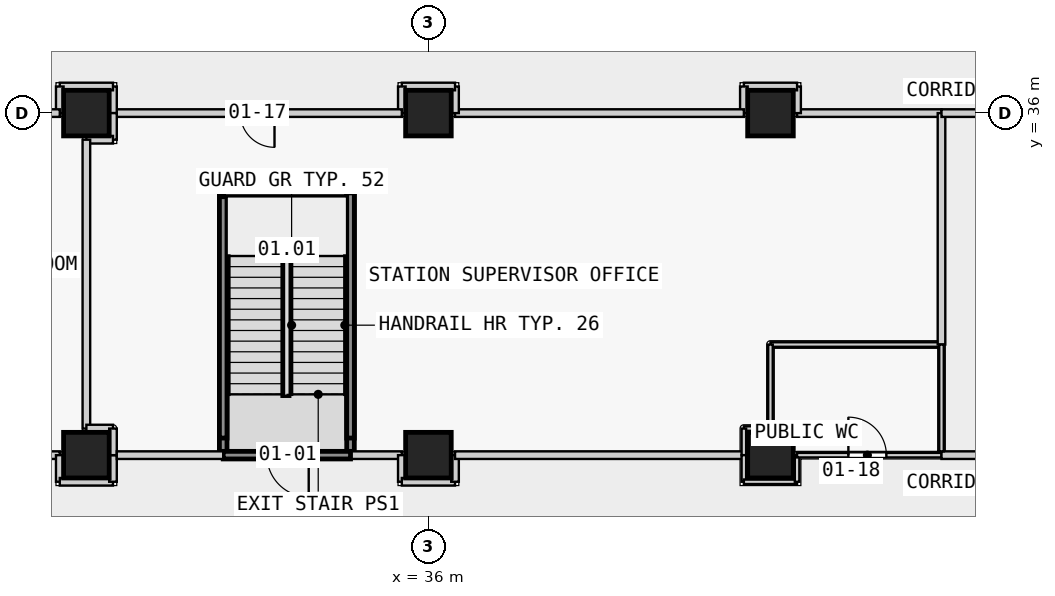
"""IFC4 building model, lengths in metres.
Left out: names, types, materials, properties, quantities, classifications, styles, units other than length and angle.
Written with IfcOpenShell. Run it as: python <this file> out.ifc"""

import sys

from ifc_helpers import new_model, si_unit, direction, frame, frame_2d, origin, origin_2d, place, context, subcontext, project, spatial, rectangle, extrude, element, fill, save


model = new_model("IFC4")
c1 = context("Model", 3, precision=1e-05, world=origin(), true_north=direction((0.0, 1.0)))
c2 = subcontext(c1, "Body", "Model", "MODEL_VIEW")
j1 = project(units=[si_unit("LENGTHUNIT", "METRE"), si_unit("PLANEANGLEUNIT", "RADIAN")], contexts=[c1])
p1 = place(None, origin())
s1 = spatial("IfcSite", under=j1, at=p1, CompositionType="ELEMENT")
p2 = place(p1, origin())
s2 = spatial("IfcBuilding", under=s1, at=p2, CompositionType="ELEMENT")
p3 = place(p2, frame((0.0, 0.0, 8.0)))
s3 = spatial("IfcBuildingStorey", under=s2, at=p3, CompositionType="ELEMENT", Elevation=8.0)
for number, where, z_axis, x_axis in (
    (1, (27.0, 27.0, 0.0), (0.0, 0.0, 1.0), (1.0, 0.0, 0.0)),
    (2, (27.0, 36.0, 0.0), (0.0, 0.0, 1.0), (1.0, 0.0, 0.0)),
    (3, (36.0, 27.0, 0.0), (0.0, 0.0, 1.0), (1.0, 0.0, 0.0)),
    (4, (36.0, 36.0, 0.0), (0.0, 0.0, 1.0), (1.0, 0.0, 0.0)),
    (5, (45.0, 27.0, 0.0), (0.0, 0.0, 1.0), (1.0, 0.0, 0.0)),
    (6, (45.0, 36.0, 0.0), (0.0, 0.0, 1.0), (1.0, 0.0, 0.0)),
):
    element("IfcColumn", number, at=place(p3, frame(where, z_axis=z_axis, x_axis=x_axis)), inside=s3, PredefinedType="COLUMN", context=c2, shape_type="SweptSolid", body=[
        extrude(rectangle(XDim=1.2, YDim=1.2, at=origin_2d()), origin(), (0.0, 0.0, 1.0), 4.8),
    ])
p4 = place(p3, frame((49.5, 36.0, 0.0), z_axis=(0.0, 0.0, 1.0), x_axis=(-1.0, 0.0, 0.0)))
e7 = element("IfcWall", 7, at=p4, inside=s3, PredefinedType="PARTITIONING", context=c2, shape_type="SweptSolid", body=[
    extrude(rectangle(XDim=3.8, YDim=0.2, at=frame_2d((1.9, 0.0))), origin(), (0.0, 0.0, 1.0), 3.75),
])
p5 = place(p3, frame((45.7, 36.0, 0.0), z_axis=(0.0, 0.0, 1.0), x_axis=(0.0, 1.0, 0.0)))
e8 = element("IfcWall", 8, at=p5, inside=s3, PredefinedType="PARTITIONING", context=c2, shape_type="SweptSolid", body=[
    extrude(rectangle(XDim=0.7, YDim=0.2, at=frame_2d((0.35, 0.0))), origin(), (0.0, 0.0, 1.0), 3.75),
])
p6 = place(p3, frame((45.7, 36.7, 0.0), z_axis=(0.0, 0.0, 1.0), x_axis=(-1.0, 0.0, 0.0)))
e9 = element("IfcWall", 9, at=p6, inside=s3, PredefinedType="PARTITIONING", context=c2, shape_type="SweptSolid", body=[
    extrude(rectangle(XDim=1.4, YDim=0.2, at=frame_2d((0.7, 0.0))), origin(), (0.0, 0.0, 1.0), 3.75),
])
p7 = place(p3, frame((44.3, 36.7, 0.0), z_axis=(0.0, 0.0, 1.0), x_axis=(0.0, -1.0, 0.0)))
e10 = element("IfcWall", 10, at=p7, inside=s3, PredefinedType="PARTITIONING", context=c2, shape_type="SweptSolid", body=[
    extrude(rectangle(XDim=0.7, YDim=0.2, at=frame_2d((0.35, 0.0))), origin(), (0.0, 0.0, 1.0), 3.75),
])
p8 = place(p3, frame((44.3, 36.0, 0.0), z_axis=(0.0, 0.0, 1.0), x_axis=(-1.0, 0.0, 0.0)))
e11 = element("IfcWall", 11, at=p8, inside=s3, PredefinedType="PARTITIONING", context=c2, shape_type="SweptSolid", body=[
    extrude(rectangle(XDim=7.6, YDim=0.2, at=frame_2d((3.8, 0.0))), origin(), (0.0, 0.0, 1.0), 3.75),
])
p9 = place(p3, frame((36.7, 36.0, 0.0), z_axis=(0.0, 0.0, 1.0), x_axis=(0.0, 1.0, 0.0)))
e12 = element("IfcWall", 12, at=p9, inside=s3, PredefinedType="PARTITIONING", context=c2, shape_type="SweptSolid", body=[
    extrude(rectangle(XDim=0.7, YDim=0.2, at=frame_2d((0.35, 0.0))), origin(), (0.0, 0.0, 1.0), 3.75),
])
p10 = place(p3, frame((36.7, 36.7, 0.0), z_axis=(0.0, 0.0, 1.0), x_axis=(-1.0, 0.0, 0.0)))
e13 = element("IfcWall", 13, at=p10, inside=s3, PredefinedType="PARTITIONING", context=c2, shape_type="SweptSolid", body=[
    extrude(rectangle(XDim=1.4, YDim=0.2, at=frame_2d((0.7, 0.0))), origin(), (0.0, 0.0, 1.0), 3.75),
])
p11 = place(p3, frame((35.3, 36.7, 0.0), z_axis=(0.0, 0.0, 1.0), x_axis=(0.0, -1.0, 0.0)))
e14 = element("IfcWall", 14, at=p11, inside=s3, PredefinedType="PARTITIONING", context=c2, shape_type="SweptSolid", body=[
    extrude(rectangle(XDim=0.7, YDim=0.2, at=frame_2d((0.35, 0.0))), origin(), (0.0, 0.0, 1.0), 3.75),
])
p12 = place(p3, frame((35.3, 36.0, 0.0), z_axis=(0.0, 0.0, 1.0), x_axis=(-1.0, 0.0, 0.0)))
e15 = element("IfcWall", 15, at=p12, inside=s3, PredefinedType="PARTITIONING", context=c2, shape_type="SweptSolid", body=[
    extrude(rectangle(XDim=7.6, YDim=0.2, at=frame_2d((3.8, 0.0))), origin(), (0.0, 0.0, 1.0), 3.75),
])
p13 = place(p12, frame((3.35, 0.0, 0.0)))
e16 = element("IfcOpeningElement", 16, at=p13, cuts=e15, PredefinedType="OPENING", context=c2, shape_type="SweptSolid", body=[
    extrude(rectangle(XDim=0.9, YDim=2.1, at=frame_2d((0.45, 1.05))), frame((0.0, 0.11, 0.0), z_axis=(0.0, -1.0, 0.0), x_axis=(1.0, 0.0, 0.0)), (0.0, 0.0, 1.0), 0.22),
])
p14 = place(p3, frame((30.6, 27.0, 0.0), z_axis=(0.0, 0.0, 1.0), x_axis=(0.0, 1.0, 0.0)))
e17 = element("IfcWall", 17, at=p14, inside=s3, PredefinedType="PARTITIONING", context=c2, shape_type="SweptSolid", body=[
    extrude(rectangle(XDim=6.9, YDim=0.2, at=frame_2d((3.45, 0.0))), origin(), (0.0, 0.0, 1.0), 3.75),
])
p15 = place(p3, frame((30.6, 33.9, 0.0), z_axis=(0.0, 0.0, 1.0), x_axis=(1.0, 0.0, 0.0)))
e18 = element("IfcWall", 18, at=p15, inside=s3, PredefinedType="PARTITIONING", context=c2, shape_type="SweptSolid", body=[
    extrude(rectangle(XDim=3.35, YDim=0.2, at=frame_2d((1.675, 0.0))), origin(), (0.0, 0.0, 1.0), 4.45),
])
p16 = place(p3, frame((33.95, 33.9, 0.0), z_axis=(0.0, 0.0, 1.0), x_axis=(0.0, -1.0, 0.0)))
e19 = element("IfcWall", 19, at=p16, inside=s3, PredefinedType="PARTITIONING", context=c2, shape_type="SweptSolid", body=[
    extrude(rectangle(XDim=6.9, YDim=0.2, at=frame_2d((3.45, 0.0))), origin(), (0.0, 0.0, 1.0), 3.75),
])
p17 = place(p3, frame((27.7, 36.0, 0.0), z_axis=(0.0, 0.0, 1.0), x_axis=(0.0, 1.0, 0.0)))
e20 = element("IfcWall", 20, at=p17, inside=s3, PredefinedType="PARTITIONING", context=c2, shape_type="SweptSolid", body=[
    extrude(rectangle(XDim=0.7, YDim=0.2, at=frame_2d((0.35, 0.0))), origin(), (0.0, 0.0, 1.0), 3.75),
])
p18 = place(p3, frame((27.7, 36.7, 0.0), z_axis=(0.0, 0.0, 1.0), x_axis=(-1.0, 0.0, 0.0)))
e21 = element("IfcWall", 21, at=p18, inside=s3, PredefinedType="PARTITIONING", context=c2, shape_type="SweptSolid", body=[
    extrude(rectangle(XDim=1.4, YDim=0.2, at=frame_2d((0.7, 0.0))), origin(), (0.0, 0.0, 1.0), 3.75),
])
p19 = place(p3, frame((26.3, 36.7, 0.0), z_axis=(0.0, 0.0, 1.0), x_axis=(0.0, -1.0, 0.0)))
e22 = element("IfcWall", 22, at=p19, inside=s3, PredefinedType="PARTITIONING", context=c2, shape_type="SweptSolid", body=[
    extrude(rectangle(XDim=0.7, YDim=0.2, at=frame_2d((0.35, 0.0))), origin(), (0.0, 0.0, 1.0), 3.75),
])
p20 = place(p3, frame((26.3, 36.0, 0.0), z_axis=(0.0, 0.0, 1.0), x_axis=(-1.0, 0.0, 0.0)))
e23 = element("IfcWall", 23, at=p20, inside=s3, PredefinedType="PARTITIONING", context=c2, shape_type="SweptSolid", body=[
    extrude(rectangle(XDim=7.3, YDim=0.2, at=frame_2d((3.65, 0.0))), origin(), (0.0, 0.0, 1.0), 3.75),
])
p21 = place(p20, frame((3.1, 0.0, 0.0)))
e24 = element("IfcOpeningElement", 24, at=p21, cuts=e23, PredefinedType="OPENING", context=c2, shape_type="SweptSolid", body=[
    extrude(rectangle(XDim=0.9, YDim=2.1, at=frame_2d((0.45, 1.05))), frame((0.0, 0.11, 0.0), z_axis=(0.0, -1.0, 0.0), x_axis=(1.0, 0.0, 0.0)), (0.0, 0.0, 1.0), 0.22),
])
p22 = place(p3, frame((33.95, 27.0, 0.0), z_axis=(0.0, 0.0, 1.0), x_axis=(1.0, 0.0, 0.0)))
e25 = element("IfcWall", 25, at=p22, inside=s3, PredefinedType="PARTITIONING", context=c2, shape_type="SweptSolid", body=[
    extrude(rectangle(XDim=1.35, YDim=0.2, at=frame_2d((0.675, 0.0))), origin(), (0.0, 0.0, 1.0), 3.75),
])
p23 = place(p3, frame((35.3, 27.0, 0.0), z_axis=(0.0, 0.0, 1.0), x_axis=(0.0, -1.0, 0.0)))
e26 = element("IfcWall", 26, at=p23, inside=s3, PredefinedType="PARTITIONING", context=c2, shape_type="SweptSolid", body=[
    extrude(rectangle(XDim=0.7, YDim=0.2, at=frame_2d((0.35, 0.0))), origin(), (0.0, 0.0, 1.0), 3.75),
])
p24 = place(p3, frame((35.3, 26.3, 0.0), z_axis=(0.0, 0.0, 1.0), x_axis=(1.0, 0.0, 0.0)))
e27 = element("IfcWall", 27, at=p24, inside=s3, PredefinedType="PARTITIONING", context=c2, shape_type="SweptSolid", body=[
    extrude(rectangle(XDim=1.4, YDim=0.2, at=frame_2d((0.7, 0.0))), origin(), (0.0, 0.0, 1.0), 3.75),
])
p25 = place(p3, frame((36.7, 26.3, 0.0), z_axis=(0.0, 0.0, 1.0), x_axis=(0.0, 1.0, 0.0)))
e28 = element("IfcWall", 28, at=p25, inside=s3, PredefinedType="PARTITIONING", context=c2, shape_type="SweptSolid", body=[
    extrude(rectangle(XDim=0.7, YDim=0.2, at=frame_2d((0.35, 0.0))), origin(), (0.0, 0.0, 1.0), 3.75),
])
for number, where, z_axis, x_axis in (
    (29, (36.7, 27.0, 0.0), (0.0, 0.0, 1.0), (1.0, 0.0, 0.0)),
    (30, (18.7, 27.0, 0.0), (0.0, 0.0, 1.0), (1.0, 0.0, 0.0)),
):
    element("IfcWall", number, at=place(p3, frame(where, z_axis=z_axis, x_axis=x_axis)), inside=s3, PredefinedType="PARTITIONING", context=c2, shape_type="SweptSolid", body=[
        extrude(rectangle(XDim=7.6, YDim=0.2, at=frame_2d((3.8, 0.0))), origin(), (0.0, 0.0, 1.0), 3.75),
    ])
p26 = place(p3, frame((26.3, 27.0, 0.0), z_axis=(0.0, 0.0, 1.0), x_axis=(0.0, -1.0, 0.0)))
e31 = element("IfcWall", 31, at=p26, inside=s3, PredefinedType="PARTITIONING", context=c2, shape_type="SweptSolid", body=[
    extrude(rectangle(XDim=0.7, YDim=0.2, at=frame_2d((0.35, 0.0))), origin(), (0.0, 0.0, 1.0), 3.75),
])
p27 = place(p3, frame((26.3, 26.3, 0.0), z_axis=(0.0, 0.0, 1.0), x_axis=(1.0, 0.0, 0.0)))
e32 = element("IfcWall", 32, at=p27, inside=s3, PredefinedType="PARTITIONING", context=c2, shape_type="SweptSolid", body=[
    extrude(rectangle(XDim=1.4, YDim=0.2, at=frame_2d((0.7, 0.0))), origin(), (0.0, 0.0, 1.0), 3.75),
])
for number, where, z_axis, x_axis in (
    (33, (27.7, 26.3, 0.0), (0.0, 0.0, 1.0), (0.0, 1.0, 0.0)),
    (34, (27.7, 36.0, 0.0), (0.0, 0.0, 1.0), (0.0, -1.0, 0.0)),
    (35, (27.7, 35.3, 0.0), (0.0, 0.0, 1.0), (-1.0, 0.0, 0.0)),
):
    element("IfcWall", number, at=place(p3, frame(where, z_axis=z_axis, x_axis=x_axis)), inside=s3, PredefinedType="PARTITIONING", context=c2, shape_type="SweptSolid", body=[
        extrude(rectangle(XDim=0.7, YDim=0.2, at=frame_2d((0.35, 0.0))), origin(), (0.0, 0.0, 1.0), 3.75),
    ])
p28 = place(p3, frame((27.0, 35.3, 0.0), z_axis=(0.0, 0.0, 1.0), x_axis=(0.0, -1.0, 0.0)))
e36 = element("IfcWall", 36, at=p28, inside=s3, PredefinedType="PARTITIONING", context=c2, shape_type="SweptSolid", body=[
    extrude(rectangle(XDim=7.6, YDim=0.2, at=frame_2d((3.8, 0.0))), origin(), (0.0, 0.0, 1.0), 3.75),
])
for number, where, z_axis, x_axis in (
    (37, (27.0, 27.7, 0.0), (0.0, 0.0, 1.0), (1.0, 0.0, 0.0)),
    (38, (27.7, 27.7, 0.0), (0.0, 0.0, 1.0), (0.0, -1.0, 0.0)),
):
    element("IfcWall", number, at=place(p3, frame(where, z_axis=z_axis, x_axis=x_axis)), inside=s3, PredefinedType="PARTITIONING", context=c2, shape_type="SweptSolid", body=[
        extrude(rectangle(XDim=0.7, YDim=0.2, at=frame_2d((0.35, 0.0))), origin(), (0.0, 0.0, 1.0), 3.75),
    ])
p29 = place(p3, frame((49.5, 29.911, 0.0), z_axis=(0.0, 0.0, 1.0), x_axis=(-1.0, 0.0, 0.0)))
e39 = element("IfcWall", 39, at=p29, inside=s3, PredefinedType="PARTITIONING", context=c2, shape_type="SweptSolid", body=[
    extrude(rectangle(XDim=4.5, YDim=0.12, at=frame_2d((2.25, 0.0))), origin(), (0.0, 0.0, 1.0), 3.75),
])
p30 = place(p3, frame((45.0, 29.911, 0.0), z_axis=(0.0, 0.0, 1.0), x_axis=(0.0, -1.0, 0.0)))
e40 = element("IfcWall", 40, at=p30, inside=s3, PredefinedType="PARTITIONING", context=c2, shape_type="SweptSolid", body=[
    extrude(rectangle(XDim=2.211, YDim=0.12, at=frame_2d((1.105, 0.0))), origin(), (0.0, 0.0, 1.0), 3.75),
])
for number, where, z_axis, x_axis in (
    (41, (45.0, 27.7, 0.0), (0.0, 0.0, 1.0), (-1.0, 0.0, 0.0)),
    (42, (44.3, 27.7, 0.0), (0.0, 0.0, 1.0), (0.0, -1.0, 0.0)),
    (43, (44.3, 27.0, 0.0), (0.0, 0.0, 1.0), (0.0, -1.0, 0.0)),
):
    element("IfcWall", number, at=place(p3, frame(where, z_axis=z_axis, x_axis=x_axis)), inside=s3, PredefinedType="PARTITIONING", context=c2, shape_type="SweptSolid", body=[
        extrude(rectangle(XDim=0.7, YDim=0.12, at=frame_2d((0.35, 0.0))), origin(), (0.0, 0.0, 1.0), 3.75),
    ])
p31 = place(p3, frame((44.3, 26.3, 0.0), z_axis=(0.0, 0.0, 1.0), x_axis=(1.0, 0.0, 0.0)))
e44 = element("IfcWall", 44, at=p31, inside=s3, PredefinedType="PARTITIONING", context=c2, shape_type="SweptSolid", body=[
    extrude(rectangle(XDim=1.4, YDim=0.12, at=frame_2d((0.7, 0.0))), origin(), (0.0, 0.0, 1.0), 3.75),
])
p32 = place(p3, frame((45.7, 26.3, 0.0), z_axis=(0.0, 0.0, 1.0), x_axis=(0.0, 1.0, 0.0)))
e45 = element("IfcWall", 45, at=p32, inside=s3, PredefinedType="PARTITIONING", context=c2, shape_type="SweptSolid", body=[
    extrude(rectangle(XDim=0.7, YDim=0.12, at=frame_2d((0.35, 0.0))), origin(), (0.0, 0.0, 1.0), 3.75),
])
p33 = place(p3, frame((45.7, 27.0, 0.0), z_axis=(0.0, 0.0, 1.0), x_axis=(1.0, 0.0, 0.0)))
e46 = element("IfcWall", 46, at=p33, inside=s3, PredefinedType="PARTITIONING", context=c2, shape_type="SweptSolid", body=[
    extrude(rectangle(XDim=3.8, YDim=0.12, at=frame_2d((1.9, 0.0))), origin(), (0.0, 0.0, 1.0), 3.75),
])
p34 = place(p33, frame((1.35, 0.0, 0.0)))
e47 = element("IfcOpeningElement", 47, at=p34, cuts=e46, PredefinedType="OPENING", context=c2, shape_type="SweptSolid", body=[
    extrude(rectangle(XDim=1.0, YDim=2.1, at=frame_2d((0.5, 1.05))), frame((0.0, 0.07, 0.0), z_axis=(0.0, -1.0, 0.0), x_axis=(1.0, 0.0, 0.0)), (0.0, 0.0, 1.0), 0.14),
])
p35 = place(p3, frame((49.5, 29.911, 0.0), z_axis=(0.0, 0.0, 1.0), x_axis=(0.0, 1.0, 0.0)))
e48 = element("IfcWall", 48, at=p35, inside=s3, PredefinedType="PARTITIONING", context=c2, shape_type="SweptSolid", body=[
    extrude(rectangle(XDim=6.089, YDim=0.2, at=frame_2d((3.044, 0.0))), origin(), (0.0, 0.0, 1.0), 3.75),
])
p36 = place(p3, frame((53.2, 36.0, 0.0), z_axis=(0.0, 0.0, 1.0), x_axis=(-1.0, 0.0, 0.0)))
e49 = element("IfcWall", 49, at=p36, inside=s3, PredefinedType="PARTITIONING", context=c2, shape_type="SweptSolid", body=[
    extrude(rectangle(XDim=3.7, YDim=0.2, at=frame_2d((1.85, 0.0))), origin(), (0.0, 0.0, 1.0), 3.75),
])
p37 = place(p36, frame((0.85, 0.0, 0.0)))
e50 = element("IfcOpeningElement", 50, at=p37, cuts=e49, PredefinedType="OPENING", context=c2, shape_type="SweptSolid", body=[
    extrude(rectangle(XDim=1.8, YDim=2.1, at=frame_2d((0.9, 1.05))), frame((0.0, 0.11, 0.0), z_axis=(0.0, -1.0, 0.0), x_axis=(1.0, 0.0, 0.0)), (0.0, 0.0, 1.0), 0.22),
])
p38 = place(p3, frame((49.5, 27.0, 0.0), z_axis=(0.0, 0.0, 1.0), x_axis=(1.0, 0.0, 0.0)))
e51 = element("IfcWall", 51, at=p38, inside=s3, PredefinedType="PARTITIONING", context=c2, shape_type="SweptSolid", body=[
    extrude(rectangle(XDim=3.8, YDim=0.2, at=frame_2d((1.9, 0.0))), origin(), (0.0, 0.0, 1.0), 3.75),
])
p39 = place(p38, frame((1.1, 0.0, 0.0)))
e52 = element("IfcOpeningElement", 52, at=p39, cuts=e51, PredefinedType="OPENING", context=c2, shape_type="SweptSolid", body=[
    extrude(rectangle(XDim=1.8, YDim=2.1, at=frame_2d((0.9, 1.05))), frame((0.0, 0.11, 0.0), z_axis=(0.0, -1.0, 0.0), x_axis=(1.0, 0.0, 0.0)), (0.0, 0.0, 1.0), 0.22),
])
p40 = place(p3, frame((33.95, 27.0, 0.0), z_axis=(0.0, 0.0, 1.0), x_axis=(-1.0, 0.0, 0.0)))
e53 = element("IfcWall", 53, at=p40, inside=s3, PredefinedType="PARTITIONING", context=c2, shape_type="SweptSolid", body=[
    extrude(rectangle(XDim=3.35, YDim=0.2, at=frame_2d((1.675, 0.0))), origin(), (0.0, 0.0, 1.0), 3.75),
])
p41 = place(p40, frame((1.1, 0.0, 0.0)))
e54 = element("IfcOpeningElement", 54, at=p41, cuts=e53, PredefinedType="OPENING", context=c2, shape_type="SweptSolid", body=[
    extrude(rectangle(XDim=1.1, YDim=2.1, at=frame_2d((0.55, 1.05))), frame((0.0, 0.11, 0.0), z_axis=(0.0, -1.0, 0.0), x_axis=(1.0, 0.0, 0.0)), (0.0, 0.0, 1.0), 0.22),
])
p42 = place(p3, frame((49.5, 27.1, 0.0), z_axis=(0.0, 0.0, 1.0), x_axis=(0.0, 1.0, 0.0)))
e55 = element("IfcWall", 55, at=p42, inside=s3, PredefinedType="PARTITIONING", context=c2, shape_type="SweptSolid", body=[
    extrude(rectangle(XDim=2.811, YDim=0.12, at=frame_2d((1.405, 0.0))), origin(), (0.0, 0.0, 1.0), 3.75),
])
p43 = place(p3, frame((27.8, 27.0, 0.0), z_axis=(0.0, 0.0, 1.0), x_axis=(1.0, 0.0, 0.0)))
e56 = element("IfcWall", 56, at=p43, inside=s3, PredefinedType="PARTITIONING", context=c2, shape_type="SweptSolid", body=[
    extrude(rectangle(XDim=2.8, YDim=0.2, at=frame_2d((1.4, 0.0))), origin(), (0.0, 0.0, 1.0), 3.75),
])
for number, where, z_axis, x_axis in (
    (57, (30.6, 27.45, 3.75), (0.0, 0.0, 1.0), (0.0, 1.0, 0.0)),
    (58, (33.95, 33.9, 3.75), (0.0, 0.0, 1.0), (0.0, -1.0, 0.0)),
):
    element("IfcWall", number, at=place(p3, frame(where, z_axis=z_axis, x_axis=x_axis)), inside=s3, PredefinedType="PARTITIONING", context=c2, shape_type="SweptSolid", body=[
        extrude(rectangle(XDim=6.45, YDim=0.2, at=frame_2d((3.225, 0.0))), origin(), (0.0, 0.0, 1.0), 0.7),
    ])
p44 = place(p41, origin())
e59 = element("IfcDoor", 59, at=p44, inside=s3, OperationType="SINGLE_SWING_LEFT", PredefinedType="DOOR", context=c2, shape_type="SweptSolid", body=[
    extrude(rectangle(XDim=1.1, YDim=2.1, at=frame_2d((0.55, 1.05))), frame((0.0, 0.025, 0.0), z_axis=(0.0, -1.0, 0.0), x_axis=(1.0, 0.0, 0.0)), (0.0, 0.0, 1.0), 0.05),
])
fill(e54, e59)
p45 = place(p13, origin())
e60 = element("IfcDoor", 60, at=p45, inside=s3, OperationType="SINGLE_SWING_LEFT", PredefinedType="DOOR", context=c2, shape_type="SweptSolid", body=[
    extrude(rectangle(XDim=0.9, YDim=2.1, at=frame_2d((0.45, 1.05))), frame((0.0, 0.025, 0.0), z_axis=(0.0, -1.0, 0.0), x_axis=(1.0, 0.0, 0.0)), (0.0, 0.0, 1.0), 0.05),
])
fill(e16, e60)
p46 = place(p34, origin())
e61 = element("IfcDoor", 61, at=p46, inside=s3, OperationType="SINGLE_SWING_LEFT", PredefinedType="DOOR", context=c2, shape_type="SweptSolid", body=[
    extrude(rectangle(XDim=1.0, YDim=2.1, at=frame_2d((0.5, 1.05))), frame((0.0, 0.025, 0.0), z_axis=(0.0, -1.0, 0.0), x_axis=(1.0, 0.0, 0.0)), (0.0, 0.0, 1.0), 0.05),
])
fill(e47, e61)
save(model, sys.argv[1])
